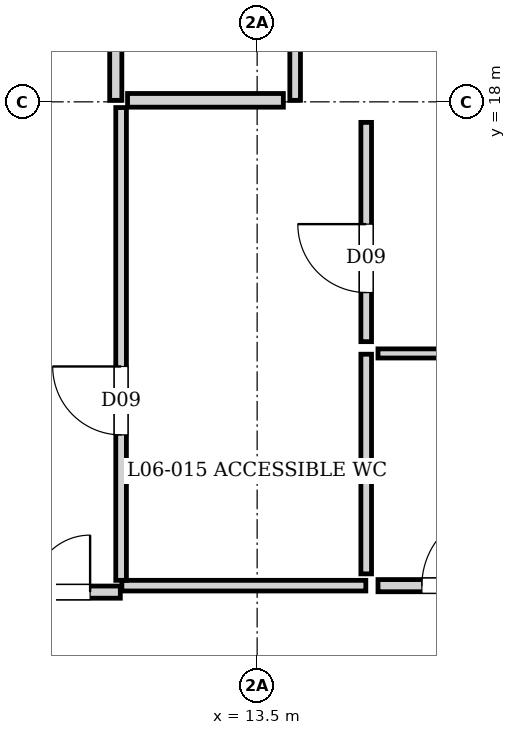
"""IFC4 building model, lengths in metres.
Left out: names, types, materials, properties, quantities, classifications, styles, units other than length and angle.
Written with IfcOpenShell. Run it as: python <this file> out.ifc"""

import sys

from ifc_helpers import new_model, si_unit, direction, frame, frame_2d, origin, place, context, subcontext, project, spatial, rectangle, extrude, element, fill, save


model = new_model("IFC4")
c1 = context("Model", 3, precision=1e-05, world=origin(), true_north=direction((0.0, 1.0)))
c2 = subcontext(c1, "Body", "Model", "MODEL_VIEW")
j1 = project(units=[si_unit("LENGTHUNIT", "METRE"), si_unit("PLANEANGLEUNIT", "RADIAN")], contexts=[c1])
p1 = place(None, origin())
s1 = spatial("IfcSite", under=j1, at=p1, CompositionType="ELEMENT")
p2 = place(p1, origin())
s2 = spatial("IfcBuilding", under=s1, at=p2, CompositionType="ELEMENT")
p3 = place(p2, frame((0.0, 0.0, 20.64)))
s3 = spatial("IfcBuildingStorey", under=s2, at=p3, CompositionType="ELEMENT", Elevation=20.64)
p4 = place(p3, frame((11.64, 18.02, 0.0), z_axis=(0.0, 0.0, 1.0), x_axis=(0.0, 1.0, 0.0)))
e1 = element("IfcWall", 1, at=p4, inside=s3, PredefinedType="PARTITIONING", context=c2, shape_type="SweptSolid", body=[
    extrude(rectangle(XDim=2.06, YDim=0.16, at=frame_2d((1.03, 0.0))), origin(), (0.0, 0.0, 1.0), 2.82),
])
p5 = place(p3, frame((14.0, 18.02, 0.0), z_axis=(0.0, 0.0, 1.0), x_axis=(0.0, 1.0, 0.0)))
e2 = element("IfcWall", 2, at=p5, inside=s3, PredefinedType="PLUMBINGWALL", context=c2, shape_type="SweptSolid", body=[
    extrude(rectangle(XDim=2.06, YDim=0.14, at=frame_2d((1.03, 0.0))), origin(), (0.0, 0.0, 1.0), 2.82),
])
p6 = place(p3, frame((11.795, 18.02, 0.0), z_axis=(0.0, 0.0, 1.0), x_axis=(1.0, 0.0, 0.0)))
e3 = element("IfcWall", 3, at=p6, inside=s3, PredefinedType="PARTITIONING", context=c2, shape_type="SweptSolid", body=[
    extrude(rectangle(XDim=2.05, YDim=0.18, at=frame_2d((1.025, 0.0))), origin(), (0.0, 0.0, 1.0), 2.48),
])
p7 = place(p3, frame((11.72, 11.635, 0.0), z_axis=(0.0, 0.0, 1.0), x_axis=(1.0, 0.0, 0.0)))
e4 = element("IfcWall", 4, at=p7, inside=s3, PredefinedType="PLUMBINGWALL", context=c2, shape_type="SweptSolid", body=[
    extrude(rectangle(XDim=3.21, YDim=0.14, at=frame_2d((1.605, 0.0))), origin(), (0.0, 0.0, 1.0), 2.82),
])
p8 = place(p3, frame((14.935, 11.79, 0.0), z_axis=(0.0, 0.0, 1.0), x_axis=(0.0, 1.0, 0.0)))
e5 = element("IfcWall", 5, at=p8, inside=s3, PredefinedType="PLUMBINGWALL", context=c2, shape_type="SweptSolid", body=[
    extrude(rectangle(XDim=2.89, YDim=0.14, at=frame_2d((1.445, 0.0))), origin(), (0.0, 0.0, 1.0), 2.82),
])
p9 = place(p3, frame((15.09, 14.69, 0.0), z_axis=(0.0, 0.0, 1.0), x_axis=(1.0, 0.0, 0.0)))
e6 = element("IfcWall", 6, at=p9, inside=s3, PredefinedType="PARTITIONING", context=c2, shape_type="SweptSolid", body=[
    extrude(rectangle(XDim=2.64, YDim=0.12, at=frame_2d((1.32, 0.0))), origin(), (0.0, 0.0, 1.0), 2.82),
])
p10 = place(p3, frame((9.405, 11.55, 0.0), z_axis=(0.0, 0.0, 1.0), x_axis=(1.0, 0.0, 0.0)))
e7 = element("IfcWall", 7, at=p10, inside=s3, PredefinedType="PARTITIONING", context=c2, shape_type="SweptSolid", body=[
    extrude(rectangle(XDim=2.295, YDim=0.16, at=frame_2d((1.147, 0.0))), origin(), (0.0, 0.0, 1.0), 2.82),
])
p11 = place(p10, frame((0.397, 0.0, 0.0)))
e8 = element("IfcOpeningElement", 8, at=p11, cuts=e7, PredefinedType="OPENING", context=c2, shape_type="SweptSolid", body=[
    extrude(rectangle(XDim=1.5, YDim=2.1, at=frame_2d((0.75, 1.05))), frame((0.0, 0.09, 0.0), z_axis=(0.0, -1.0, 0.0), x_axis=(1.0, 0.0, 0.0)), (0.0, 0.0, 1.0), 0.18),
])
p12 = place(p3, frame((15.09, 11.635, 0.0), z_axis=(0.0, 0.0, 1.0), x_axis=(1.0, 0.0, 0.0)))
e9 = element("IfcWall", 9, at=p12, inside=s3, PredefinedType="PARTITIONING", context=c2, shape_type="SweptSolid", body=[
    extrude(rectangle(XDim=2.835, YDim=0.16, at=frame_2d((1.417, 0.0))), origin(), (0.0, 0.0, 1.0), 2.82),
])
p13 = place(p12, frame((0.577, 0.0, 0.0)))
e10 = element("IfcOpeningElement", 10, at=p13, cuts=e9, PredefinedType="OPENING", context=c2, shape_type="SweptSolid", body=[
    extrude(rectangle(XDim=1.0, YDim=2.1, at=frame_2d((0.5, 1.05))), frame((0.0, 0.09, 0.0), z_axis=(0.0, -1.0, 0.0), x_axis=(1.0, 0.0, 0.0)), (0.0, 0.0, 1.0), 0.18),
])
p14 = place(p3, frame((11.71, 11.705, 0.0), z_axis=(0.0, 0.0, 1.0), x_axis=(0.0, 1.0, 0.0)))
e11 = element("IfcWall", 11, at=p14, inside=s3, PredefinedType="PLUMBINGWALL", context=c2, shape_type="SweptSolid", body=[
    extrude(rectangle(XDim=6.22, YDim=0.14, at=frame_2d((3.11, 0.0))), origin(), (0.0, 0.0, 1.0), 2.82),
])
p15 = place(p14, frame((1.914, 0.0, 0.0)))
e12 = element("IfcOpeningElement", 12, at=p15, cuts=e11, PredefinedType="OPENING", context=c2, shape_type="SweptSolid", body=[
    extrude(rectangle(XDim=0.9, YDim=2.1, at=frame_2d((0.45, 1.05))), frame((0.0, 0.08, 0.0), z_axis=(0.0, -1.0, 0.0), x_axis=(1.0, 0.0, 0.0)), (0.0, 0.0, 1.0), 0.16),
])
p16 = place(p3, frame((14.935, 14.845, 0.0), z_axis=(0.0, 0.0, 1.0), x_axis=(0.0, 1.0, 0.0)))
e13 = element("IfcWall", 13, at=p16, inside=s3, PredefinedType="PLUMBINGWALL", context=c2, shape_type="SweptSolid", body=[
    extrude(rectangle(XDim=2.885, YDim=0.14, at=frame_2d((1.442, 0.0))), origin(), (0.0, 0.0, 1.0), 2.82),
])
p17 = place(p16, frame((0.646, 0.0, 0.0)))
e14 = element("IfcOpeningElement", 14, at=p17, cuts=e13, PredefinedType="OPENING", context=c2, shape_type="SweptSolid", body=[
    extrude(rectangle(XDim=0.9, YDim=2.1, at=frame_2d((0.45, 1.05))), frame((0.0, 0.08, 0.0), z_axis=(0.0, -1.0, 0.0), x_axis=(1.0, 0.0, 0.0)), (0.0, 0.0, 1.0), 0.16),
])
p18 = place(p11, origin())
e15 = element("IfcDoor", 15, at=p18, inside=s3, OperationType="DOUBLE_DOOR_SINGLE_SWING", PredefinedType="DOOR", context=c2, shape_type="SweptSolid", body=[
    extrude(rectangle(XDim=1.5, YDim=2.1, at=frame_2d((0.75, 1.05))), frame((0.0, 0.025, 0.0), z_axis=(0.0, -1.0, 0.0), x_axis=(1.0, 0.0, 0.0)), (0.0, 0.0, 1.0), 0.05),
])
fill(e8, e15)
p19 = place(p13, origin())
e16 = element("IfcDoor", 16, at=p19, inside=s3, OperationType="SINGLE_SWING_RIGHT", PredefinedType="DOOR", context=c2, shape_type="SweptSolid", body=[
    extrude(rectangle(XDim=1.0, YDim=2.1, at=frame_2d((0.5, 1.05))), frame((0.0, 0.025, 0.0), z_axis=(0.0, -1.0, 0.0), x_axis=(1.0, 0.0, 0.0)), (0.0, 0.0, 1.0), 0.05),
])
fill(e10, e16)
p20 = place(p15, origin())
e17 = element("IfcDoor", 17, at=p20, inside=s3, OperationType="SINGLE_SWING_RIGHT", PredefinedType="DOOR", context=c2, shape_type="SweptSolid", body=[
    extrude(rectangle(XDim=0.9, YDim=2.1, at=frame_2d((0.45, 1.05))), frame((0.0, 0.025, 0.0), z_axis=(0.0, -1.0, 0.0), x_axis=(1.0, 0.0, 0.0)), (0.0, 0.0, 1.0), 0.05),
])
fill(e12, e17)
p21 = place(p17, origin())
e18 = element("IfcDoor", 18, at=p21, inside=s3, OperationType="SINGLE_SWING_RIGHT", PredefinedType="DOOR", context=c2, shape_type="SweptSolid", body=[
    extrude(rectangle(XDim=0.9, YDim=2.1, at=frame_2d((0.45, 1.05))), frame((0.0, 0.025, 0.0), z_axis=(0.0, -1.0, 0.0), x_axis=(1.0, 0.0, 0.0)), (0.0, 0.0, 1.0), 0.05),
])
fill(e14, e18)
save(model, sys.argv[1])
